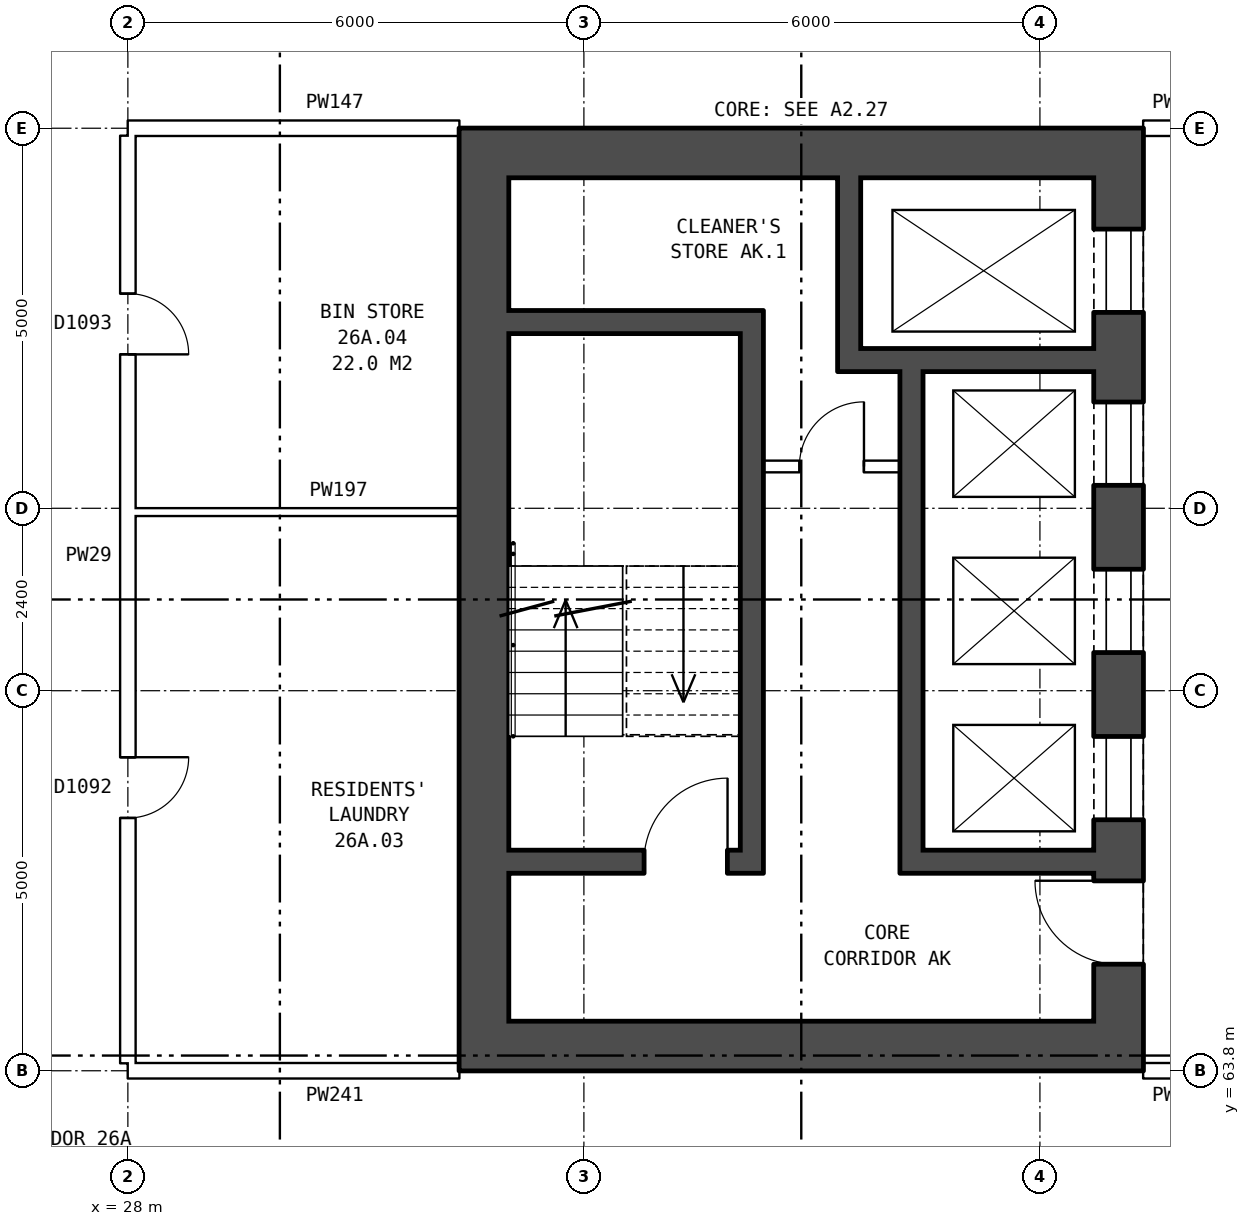
"""IFC4 building model, lengths in metres.
Left out: names, types, materials, properties, quantities, classifications, styles, units other than length and angle.
Written with IfcOpenShell. Run it as: python <this file> out.ifc"""

import sys

from ifc_helpers import new_model, si_unit, direction, frame, frame_2d, origin, place, context, subcontext, project, spatial, rectangle, extrude, element, fill, save


model = new_model("IFC4")
c1 = context("Model", 3, precision=1e-05, world=origin(), true_north=direction((0.0, 1.0)))
c2 = subcontext(c1, "Body", "Model", "MODEL_VIEW")
j1 = project(units=[si_unit("LENGTHUNIT", "METRE"), si_unit("PLANEANGLEUNIT", "RADIAN")], contexts=[c1])
p1 = place(None, origin())
s1 = spatial("IfcSite", under=j1, at=p1, CompositionType="ELEMENT")
p2 = place(p1, origin())
s2 = spatial("IfcBuilding", under=s1, at=p2, CompositionType="ELEMENT")
p3 = place(p2, frame((0.0, 0.0, 96.4)))
s3 = spatial("IfcBuildingStorey", under=s2, at=p3, CompositionType="ELEMENT", Elevation=96.4)
p4 = place(p3, frame((41.035, 75.55, 0.0), z_axis=(0.0, 0.0, 1.0), x_axis=(0.0, -1.0, 0.0)))
e1 = element("IfcWall", 1, at=p4, inside=s3, PredefinedType="SHEAR", context=c2, shape_type="SweptSolid", body=[
    extrude(rectangle(XDim=11.1, YDim=0.65, at=frame_2d((5.55, 0.0))), origin(), (0.0, 0.0, 1.0), 2.85),
])
p5 = place(p4, frame((0.675, 0.0, 0.0)))
e2 = element("IfcOpeningElement", 2, at=p5, cuts=e1, PredefinedType="OPENING", context=c2, shape_type="SweptSolid", body=[
    extrude(rectangle(XDim=1.1, YDim=2.1, at=frame_2d((0.55, 1.05))), frame((0.0, 0.335, 0.0), z_axis=(0.0, -1.0, 0.0), x_axis=(1.0, 0.0, 0.0)), (0.0, 0.0, 1.0), 0.67),
])
p6 = place(p4, frame((2.95, 0.0, 0.0)))
e3 = element("IfcOpeningElement", 3, at=p6, cuts=e1, PredefinedType="OPENING", context=c2, shape_type="SweptSolid", body=[
    extrude(rectangle(XDim=1.1, YDim=2.1, at=frame_2d((0.55, 1.05))), frame((0.0, 0.335, 0.0), z_axis=(0.0, -1.0, 0.0), x_axis=(1.0, 0.0, 0.0)), (0.0, 0.0, 1.0), 0.67),
])
p7 = place(p4, frame((5.15, 0.0, 0.0)))
e4 = element("IfcOpeningElement", 4, at=p7, cuts=e1, PredefinedType="OPENING", context=c2, shape_type="SweptSolid", body=[
    extrude(rectangle(XDim=1.1, YDim=2.1, at=frame_2d((0.55, 1.05))), frame((0.0, 0.335, 0.0), z_axis=(0.0, -1.0, 0.0), x_axis=(1.0, 0.0, 0.0)), (0.0, 0.0, 1.0), 0.67),
])
p8 = place(p4, frame((7.35, 0.0, 0.0)))
e5 = element("IfcOpeningElement", 5, at=p8, cuts=e1, PredefinedType="OPENING", context=c2, shape_type="SweptSolid", body=[
    extrude(rectangle(XDim=1.1, YDim=2.1, at=frame_2d((0.55, 1.05))), frame((0.0, 0.335, 0.0), z_axis=(0.0, -1.0, 0.0), x_axis=(1.0, 0.0, 0.0)), (0.0, 0.0, 1.0), 0.67),
])
p9 = place(p4, frame((9.25, 0.0, 0.0)))
e6 = element("IfcOpeningElement", 6, at=p9, cuts=e1, PredefinedType="OPENING", context=c2, shape_type="SweptSolid", body=[
    extrude(rectangle(XDim=1.1, YDim=2.1, at=frame_2d((0.55, 1.05))), frame((0.0, 0.335, 0.0), z_axis=(0.0, -1.0, 0.0), x_axis=(1.0, 0.0, 0.0)), (0.0, 0.0, 1.0), 0.67),
])
p10 = place(p3, frame((32.685, 75.55, 0.0), z_axis=(0.0, 0.0, 1.0), x_axis=(0.0, -1.0, 0.0)))
e7 = element("IfcWall", 7, at=p10, inside=s3, PredefinedType="SHEAR", context=c2, shape_type="SweptSolid", body=[
    extrude(rectangle(XDim=11.1, YDim=0.65, at=frame_2d((5.55, 0.0))), origin(), (0.0, 0.0, 1.0), 2.85),
])
for number, where, z_axis, x_axis in (
    (8, (41.36, 75.875, 0.0), (0.0, 0.0, 1.0), (-1.0, 0.0, 0.0)),
    (9, (41.36, 64.125, 0.0), (0.0, 0.0, 1.0), (-1.0, 0.0, 0.0)),
):
    element("IfcWall", number, at=place(p3, frame(where, z_axis=z_axis, x_axis=x_axis)), inside=s3, PredefinedType="SHEAR", context=c2, shape_type="SweptSolid", body=[
        extrude(rectangle(XDim=9.0, YDim=0.65, at=frame_2d((4.5, 0.0))), origin(), (0.0, 0.0, 1.0), 2.85),
    ])
p11 = place(p3, frame((36.06, 73.65, 0.0), z_axis=(0.0, 0.0, 1.0), x_axis=(-1.0, 0.0, 0.0)))
e10 = element("IfcWall", 10, at=p11, inside=s3, PredefinedType="SHEAR", context=c2, shape_type="SweptSolid", body=[
    extrude(rectangle(XDim=3.05, YDim=0.3, at=frame_2d((1.525, 0.0))), origin(), (0.0, 0.0, 1.0), 2.85),
])
p12 = place(p3, frame((40.71, 73.15, 0.0), z_axis=(0.0, 0.0, 1.0), x_axis=(-1.0, 0.0, 0.0)))
e11 = element("IfcWall", 11, at=p12, inside=s3, PredefinedType="SHEAR", context=c2, shape_type="SweptSolid", body=[
    extrude(rectangle(XDim=3.37, YDim=0.3, at=frame_2d((1.685, 0.0))), origin(), (0.0, 0.0, 1.0), 2.85),
])
p13 = place(p3, frame((38.16, 71.75, 0.0), z_axis=(0.0, 0.0, 1.0), x_axis=(-1.0, 0.0, 0.0)))
e12 = element("IfcWall", 12, at=p13, inside=s3, PredefinedType="PARTITIONING", context=c2, shape_type="SweptSolid", body=[
    extrude(rectangle(XDim=1.8, YDim=0.15, at=frame_2d((0.9, 0.0))), origin(), (0.0, 0.0, 1.0), 2.85),
])
p14 = place(p13, frame((0.475, 0.0, 0.0)))
e13 = element("IfcOpeningElement", 13, at=p14, cuts=e12, PredefinedType="OPENING", context=c2, shape_type="SweptSolid", body=[
    extrude(rectangle(XDim=0.85, YDim=2.1, at=frame_2d((0.425, 1.05))), frame((0.0, 0.085, 0.0), z_axis=(0.0, -1.0, 0.0), x_axis=(1.0, 0.0, 0.0)), (0.0, 0.0, 1.0), 0.17),
])
p15 = place(p3, frame((40.71, 66.55, 0.0), z_axis=(0.0, 0.0, 1.0), x_axis=(-1.0, 0.0, 0.0)))
e14 = element("IfcWall", 14, at=p15, inside=s3, PredefinedType="SHEAR", context=c2, shape_type="SweptSolid", body=[
    extrude(rectangle(XDim=2.25, YDim=0.3, at=frame_2d((1.125, 0.0))), origin(), (0.0, 0.0, 1.0), 2.85),
])
p16 = place(p3, frame((36.06, 66.55, 0.0), z_axis=(0.0, 0.0, 1.0), x_axis=(-1.0, 0.0, 0.0)))
e15 = element("IfcWall", 15, at=p16, inside=s3, PredefinedType="SHEAR", context=c2, shape_type="SweptSolid", body=[
    extrude(rectangle(XDim=3.05, YDim=0.3, at=frame_2d((1.525, 0.0))), origin(), (0.0, 0.0, 1.0), 2.85),
])
p17 = place(p16, frame((0.17, 0.0, 0.0)))
e16 = element("IfcOpeningElement", 16, at=p17, cuts=e15, PredefinedType="OPENING", context=c2, shape_type="SweptSolid", body=[
    extrude(rectangle(XDim=1.1, YDim=2.1, at=frame_2d((0.55, 1.05))), frame((0.0, 0.16, 0.0), z_axis=(0.0, -1.0, 0.0), x_axis=(1.0, 0.0, 0.0)), (0.0, 0.0, 1.0), 0.32),
])
p18 = place(p3, frame((38.31, 73.0, 0.0), z_axis=(0.0, 0.0, 1.0), x_axis=(0.0, -1.0, 0.0)))
e17 = element("IfcWall", 17, at=p18, inside=s3, PredefinedType="SHEAR", context=c2, shape_type="SweptSolid", body=[
    extrude(rectangle(XDim=6.6, YDim=0.3, at=frame_2d((3.3, 0.0))), origin(), (0.0, 0.0, 1.0), 2.85),
])
p19 = place(p3, frame((37.49, 75.55, 0.0), z_axis=(0.0, 0.0, 1.0), x_axis=(0.0, -1.0, 0.0)))
e18 = element("IfcWall", 18, at=p19, inside=s3, PredefinedType="SHEAR", context=c2, shape_type="SweptSolid", body=[
    extrude(rectangle(XDim=2.25, YDim=0.3, at=frame_2d((1.125, 0.0))), origin(), (0.0, 0.0, 1.0), 2.85),
])
p20 = place(p3, frame((36.21, 73.8, 0.0), z_axis=(0.0, 0.0, 1.0), x_axis=(0.0, -1.0, 0.0)))
e19 = element("IfcWall", 19, at=p20, inside=s3, PredefinedType="SHEAR", context=c2, shape_type="SweptSolid", body=[
    extrude(rectangle(XDim=7.4, YDim=0.3, at=frame_2d((3.7, 0.0))), origin(), (0.0, 0.0, 1.0), 2.85),
])
p21 = place(p3, frame((28.0, 63.8, 0.0), z_axis=(0.0, 0.0, 1.0), x_axis=(1.0, 0.0, 0.0)))
e20 = element("IfcWall", 20, at=p21, inside=s3, PredefinedType="PARTITIONING", context=c2, shape_type="SweptSolid", body=[
    extrude(rectangle(XDim=4.36, YDim=0.2, at=frame_2d((2.18, 0.0))), origin(), (0.0, 0.0, 1.0), 2.85),
])
p22 = place(p3, frame((41.36, 63.8, 0.0), z_axis=(0.0, 0.0, 1.0), x_axis=(1.0, 0.0, 0.0)))
e21 = element("IfcWall", 21, at=p22, inside=s3, PredefinedType="PARTITIONING", context=c2, shape_type="SweptSolid", body=[
    extrude(rectangle(XDim=3.0, YDim=0.2, at=frame_2d((1.5, 0.0))), origin(), (0.0, 0.0, 1.0), 2.85),
])
p23 = place(p22, frame((1.0, 0.0, 0.0)))
e22 = element("IfcOpeningElement", 22, at=p23, cuts=e21, PredefinedType="OPENING", context=c2, shape_type="SweptSolid", body=[
    extrude(rectangle(XDim=1.0, YDim=2.1, at=frame_2d((0.5, 1.05))), frame((0.0, 0.11, 0.0), z_axis=(0.0, -1.0, 0.0), x_axis=(1.0, 0.0, 0.0)), (0.0, 0.0, 1.0), 0.22),
])
p24 = place(p3, frame((28.1, 71.15, 0.0), z_axis=(0.0, 0.0, 1.0), x_axis=(1.0, 0.0, 0.0)))
e23 = element("IfcWall", 23, at=p24, inside=s3, PredefinedType="PARTITIONING", context=c2, shape_type="SweptSolid", body=[
    extrude(rectangle(XDim=4.26, YDim=0.1, at=frame_2d((2.13, 0.0))), origin(), (0.0, 0.0, 1.0), 2.85),
])
p25 = place(p3, frame((28.0, 76.2, 0.0), z_axis=(0.0, 0.0, 1.0), x_axis=(1.0, 0.0, 0.0)))
e24 = element("IfcWall", 24, at=p25, inside=s3, PredefinedType="PARTITIONING", context=c2, shape_type="SweptSolid", body=[
    extrude(rectangle(XDim=4.36, YDim=0.2, at=frame_2d((2.18, 0.0))), origin(), (0.0, 0.0, 1.0), 2.85),
])
p26 = place(p3, frame((41.36, 76.2, 0.0), z_axis=(0.0, 0.0, 1.0), x_axis=(1.0, 0.0, 0.0)))
e25 = element("IfcWall", 25, at=p26, inside=s3, PredefinedType="PARTITIONING", context=c2, shape_type="SweptSolid", body=[
    extrude(rectangle(XDim=3.0, YDim=0.2, at=frame_2d((1.5, 0.0))), origin(), (0.0, 0.0, 1.0), 2.85),
])
p27 = place(p26, frame((1.0, 0.0, 0.0)))
e26 = element("IfcOpeningElement", 26, at=p27, cuts=e25, PredefinedType="OPENING", context=c2, shape_type="SweptSolid", body=[
    extrude(rectangle(XDim=1.0, YDim=2.1, at=frame_2d((0.5, 1.05))), frame((0.0, 0.11, 0.0), z_axis=(0.0, -1.0, 0.0), x_axis=(1.0, 0.0, 0.0)), (0.0, 0.0, 1.0), 0.22),
])
p28 = place(p3, frame((28.0, 63.9, 0.0), z_axis=(0.0, 0.0, 1.0), x_axis=(0.0, 1.0, 0.0)))
e27 = element("IfcWall", 27, at=p28, inside=s3, PredefinedType="PARTITIONING", context=c2, shape_type="SweptSolid", body=[
    extrude(rectangle(XDim=12.2, YDim=0.2, at=frame_2d((6.1, 0.0))), origin(), (0.0, 0.0, 1.0), 2.85),
])
p29 = place(p28, frame((3.225, 0.0, 0.0)))
e28 = element("IfcOpeningElement", 28, at=p29, cuts=e27, PredefinedType="OPENING", context=c2, shape_type="SweptSolid", body=[
    extrude(rectangle(XDim=0.8, YDim=2.1, at=frame_2d((0.4, 1.05))), frame((0.0, 0.11, 0.0), z_axis=(0.0, -1.0, 0.0), x_axis=(1.0, 0.0, 0.0)), (0.0, 0.0, 1.0), 0.22),
])
p30 = place(p28, frame((9.325, 0.0, 0.0)))
e29 = element("IfcOpeningElement", 29, at=p30, cuts=e27, PredefinedType="OPENING", context=c2, shape_type="SweptSolid", body=[
    extrude(rectangle(XDim=0.8, YDim=2.1, at=frame_2d((0.4, 1.05))), frame((0.0, 0.11, 0.0), z_axis=(0.0, -1.0, 0.0), x_axis=(1.0, 0.0, 0.0)), (0.0, 0.0, 1.0), 0.22),
])
p31 = place(p5, origin())
e30 = element("IfcDoor", 30, at=p31, inside=s3, OperationType="DOUBLE_DOOR_SLIDING", PredefinedType="DOOR", context=c2, shape_type="SweptSolid", body=[
    extrude(rectangle(XDim=1.1, YDim=2.1, at=frame_2d((0.55, 1.05))), frame((0.0, -0.26, 0.0), z_axis=(0.0, -1.0, 0.0), x_axis=(1.0, 0.0, 0.0)), (0.0, 0.0, 1.0), 0.05),
])
fill(e2, e30)
p32 = place(p6, origin())
e31 = element("IfcDoor", 31, at=p32, inside=s3, OperationType="DOUBLE_DOOR_SLIDING", PredefinedType="DOOR", context=c2, shape_type="SweptSolid", body=[
    extrude(rectangle(XDim=1.1, YDim=2.1, at=frame_2d((0.55, 1.05))), frame((0.0, -0.26, 0.0), z_axis=(0.0, -1.0, 0.0), x_axis=(1.0, 0.0, 0.0)), (0.0, 0.0, 1.0), 0.05),
])
fill(e3, e31)
p33 = place(p7, origin())
e32 = element("IfcDoor", 32, at=p33, inside=s3, OperationType="DOUBLE_DOOR_SLIDING", PredefinedType="DOOR", context=c2, shape_type="SweptSolid", body=[
    extrude(rectangle(XDim=1.1, YDim=2.1, at=frame_2d((0.55, 1.05))), frame((0.0, -0.26, 0.0), z_axis=(0.0, -1.0, 0.0), x_axis=(1.0, 0.0, 0.0)), (0.0, 0.0, 1.0), 0.05),
])
fill(e4, e32)
p34 = place(p8, origin())
e33 = element("IfcDoor", 33, at=p34, inside=s3, OperationType="DOUBLE_DOOR_SLIDING", PredefinedType="DOOR", context=c2, shape_type="SweptSolid", body=[
    extrude(rectangle(XDim=1.1, YDim=2.1, at=frame_2d((0.55, 1.05))), frame((0.0, -0.26, 0.0), z_axis=(0.0, -1.0, 0.0), x_axis=(1.0, 0.0, 0.0)), (0.0, 0.0, 1.0), 0.05),
])
fill(e5, e33)
p35 = place(p9, frame((1.1, 0.0, 0.0), z_axis=(0.0, 0.0, 1.0), x_axis=(-1.0, 0.0, 0.0)))
e34 = element("IfcDoor", 34, at=p35, inside=s3, OperationType="SINGLE_SWING_RIGHT", PredefinedType="DOOR", context=c2, shape_type="SweptSolid", body=[
    extrude(rectangle(XDim=1.1, YDim=2.1, at=frame_2d((0.55, 1.05))), frame((0.0, 0.31, 0.0), z_axis=(0.0, -1.0, 0.0), x_axis=(1.0, 0.0, 0.0)), (0.0, 0.0, 1.0), 0.05),
])
fill(e6, e34)
p36 = place(p17, frame((1.1, 0.0, 0.0), z_axis=(0.0, 0.0, 1.0), x_axis=(-1.0, 0.0, 0.0)))
e35 = element("IfcDoor", 35, at=p36, inside=s3, OperationType="SINGLE_SWING_RIGHT", PredefinedType="DOOR", context=c2, shape_type="SweptSolid", body=[
    extrude(rectangle(XDim=1.1, YDim=2.1, at=frame_2d((0.55, 1.05))), frame((0.0, 0.025, 0.0), z_axis=(0.0, -1.0, 0.0), x_axis=(1.0, 0.0, 0.0)), (0.0, 0.0, 1.0), 0.05),
])
fill(e16, e35)
p37 = place(p14, frame((0.85, 0.0, 0.0), z_axis=(0.0, 0.0, 1.0), x_axis=(-1.0, 0.0, 0.0)))
e36 = element("IfcDoor", 36, at=p37, inside=s3, OperationType="SINGLE_SWING_RIGHT", PredefinedType="DOOR", context=c2, shape_type="SweptSolid", body=[
    extrude(rectangle(XDim=0.85, YDim=2.1, at=frame_2d((0.425, 1.05))), frame((0.0, 0.025, 0.0), z_axis=(0.0, -1.0, 0.0), x_axis=(1.0, 0.0, 0.0)), (0.0, 0.0, 1.0), 0.05),
])
fill(e13, e36)
p38 = place(p29, frame((0.8, 0.0, 0.0), z_axis=(0.0, 0.0, 1.0), x_axis=(-1.0, 0.0, 0.0)))
e37 = element("IfcDoor", 37, at=p38, inside=s3, OperationType="SINGLE_SWING_LEFT", PredefinedType="DOOR", context=c2, shape_type="SweptSolid", body=[
    extrude(rectangle(XDim=0.8, YDim=2.1, at=frame_2d((0.4, 1.05))), frame((0.0, 0.025, 0.0), z_axis=(0.0, -1.0, 0.0), x_axis=(1.0, 0.0, 0.0)), (0.0, 0.0, 1.0), 0.05),
])
fill(e28, e37)
p39 = place(p30, frame((0.8, 0.0, 0.0), z_axis=(0.0, 0.0, 1.0), x_axis=(-1.0, 0.0, 0.0)))
e38 = element("IfcDoor", 38, at=p39, inside=s3, OperationType="SINGLE_SWING_RIGHT", PredefinedType="DOOR", context=c2, shape_type="SweptSolid", body=[
    extrude(rectangle(XDim=0.8, YDim=2.1, at=frame_2d((0.4, 1.05))), frame((0.0, 0.025, 0.0), z_axis=(0.0, -1.0, 0.0), x_axis=(1.0, 0.0, 0.0)), (0.0, 0.0, 1.0), 0.05),
])
fill(e29, e38)
save(model, sys.argv[1])
